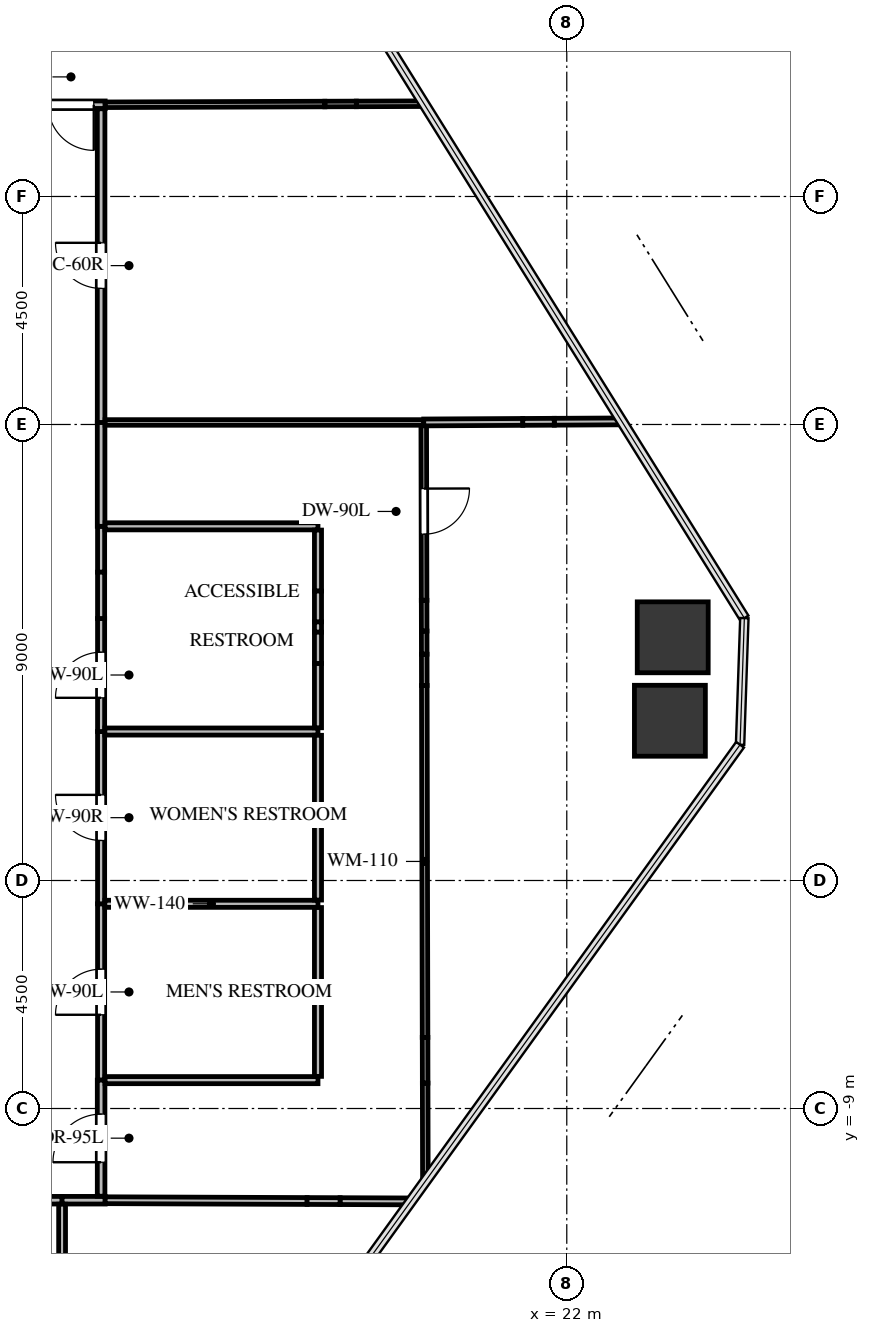
"""IFC4 building model, lengths in metres.
Left out: names, types, materials, properties, quantities, classifications, styles, units other than length and angle.
Written with IfcOpenShell. Run it as: python <this file> out.ifc"""

import sys

from ifc_helpers import new_model, si_unit, direction, frame, frame_2d, origin, origin_2d, place, context, subcontext, project, spatial, rectangle, extrude, source, transform, mapped, element, fill, save


model = new_model("IFC4")
c1 = context("Model", 3, precision=1e-05, world=origin(), true_north=direction((0.0, 1.0)))
c2 = subcontext(c1, "Body", "Model", "MODEL_VIEW")
j1 = project(units=[si_unit("LENGTHUNIT", "METRE"), si_unit("PLANEANGLEUNIT", "RADIAN")], contexts=[c1])
p1 = place(None, origin())
s1 = spatial("IfcSite", under=j1, at=p1, CompositionType="ELEMENT")
p2 = place(p1, origin())
s2 = spatial("IfcBuilding", under=s1, at=p2, CompositionType="ELEMENT")
p3 = place(p2, frame((0.0, 0.0, 75.3)))
s3 = spatial("IfcBuildingStorey", under=s2, at=p3, CompositionType="ELEMENT", Elevation=75.3)
m1 = source(origin(), c2, "Body", "SweptSolid", [
    extrude(rectangle(XDim=1.4, YDim=1.4, at=origin_2d()), origin(), (0.0, 0.0, 1.0), 3.0),
])
for number, where, z_axis, x_axis in (
    (1, (24.091, 0.3, -0.24), (0.0, 0.0, 1.0), (1.0, 0.0, 0.0)),
    (2, (24.035, -1.347, -0.24), (0.0, 0.0, 1.0), (1.0, 0.0, 0.0)),
):
    element("IfcColumn", number, at=place(p3, frame(where, z_axis=z_axis, x_axis=x_axis)), inside=s3, PredefinedType="COLUMN", context=c2, shape_type="MappedRepresentation", body=[
        mapped(m1, transform((0.0, 0.0, 0.0), x_axis=(1.0, 0.0, 0.0), y_axis=(0.0, 1.0, 0.0), z_axis=(0.0, 0.0, 1.0), scale=1.0)),
    ])
p4 = place(p3, frame((12.81, -8.44, 0.0), z_axis=(0.0, 0.0, 1.0), x_axis=(0.0, 1.0, 0.0)))
e3 = element("IfcWall", 3, at=p4, inside=s3, PredefinedType="PARTITIONING", context=c2, shape_type="SweptSolid", body=[
    extrude(rectangle(XDim=3.48, YDim=0.14, at=frame_2d((1.74, 0.0))), origin(), (0.0, 0.0, 1.0), 2.745),
])
p5 = place(p4, frame((1.29, 0.0, 0.0)))
e4 = element("IfcOpeningElement", 4, at=p5, cuts=e3, PredefinedType="OPENING", context=c2, shape_type="SweptSolid", body=[
    extrude(rectangle(XDim=0.9, YDim=2.05, at=frame_2d((0.45, 1.025))), frame((0.0, 0.08, 0.0), z_axis=(0.0, -1.0, 0.0), x_axis=(1.0, 0.0, 0.0)), (0.0, 0.0, 1.0), 0.16),
])
p6 = place(p3, frame((12.81, -4.96, 0.0), z_axis=(0.0, 0.0, 1.0), x_axis=(0.0, 1.0, 0.0)))
e5 = element("IfcWall", 5, at=p6, inside=s3, PredefinedType="PARTITIONING", context=c2, shape_type="SweptSolid", body=[
    extrude(rectangle(XDim=3.4, YDim=0.14, at=frame_2d((1.7, 0.0))), origin(), (0.0, 0.0, 1.0), 2.745),
])
p7 = place(p6, frame((1.25, 0.0, 0.0)))
e6 = element("IfcOpeningElement", 6, at=p7, cuts=e5, PredefinedType="OPENING", context=c2, shape_type="SweptSolid", body=[
    extrude(rectangle(XDim=0.9, YDim=2.05, at=frame_2d((0.45, 1.025))), frame((0.0, 0.08, 0.0), z_axis=(0.0, -1.0, 0.0), x_axis=(1.0, 0.0, 0.0)), (0.0, 0.0, 1.0), 0.16),
])
p8 = place(p3, frame((12.81, -1.56, 0.0), z_axis=(0.0, 0.0, 1.0), x_axis=(0.0, 1.0, 0.0)))
e7 = element("IfcWall", 7, at=p8, inside=s3, PredefinedType="PARTITIONING", context=c2, shape_type="SweptSolid", body=[
    extrude(rectangle(XDim=2.231, YDim=0.14, at=frame_2d((1.116, 0.0))), origin(), (0.0, 0.0, 1.0), 2.745),
])
p9 = place(p8, frame((0.666, 0.0, 0.0)))
e8 = element("IfcOpeningElement", 8, at=p9, cuts=e7, PredefinedType="OPENING", context=c2, shape_type="SweptSolid", body=[
    extrude(rectangle(XDim=0.9, YDim=2.05, at=frame_2d((0.45, 1.025))), frame((0.0, 0.08, 0.0), z_axis=(0.0, -1.0, 0.0), x_axis=(1.0, 0.0, 0.0)), (0.0, 0.0, 1.0), 0.16),
])
p10 = place(p3, frame((12.81, 1.585, 0.0), z_axis=(0.0, 0.0, 1.0), x_axis=(0.0, 1.0, 0.0)))
e9 = element("IfcWall", 9, at=p10, inside=s3, PredefinedType="PARTITIONING", context=c2, shape_type="SweptSolid", body=[
    extrude(rectangle(XDim=0.905, YDim=0.14, at=frame_2d((0.453, 0.0))), origin(), (0.0, 0.0, 1.0), 2.745),
])
p11 = place(p3, frame((12.81, 0.671, 0.0), z_axis=(0.0, 0.0, 1.0), x_axis=(0.0, 1.0, 0.0)))
e10 = element("IfcWall", 10, at=p11, inside=s3, PredefinedType="PARTITIONING", context=c2, shape_type="SweptSolid", body=[
    extrude(rectangle(XDim=0.914, YDim=0.14, at=frame_2d((0.457, 0.0))), origin(), (0.0, 0.0, 1.0), 1.83),
])
p12 = place(p3, frame((12.89, 10.81, 0.0), z_axis=(0.0, 0.0, 1.0), x_axis=(-1.0, 0.0, 0.0)))
e11 = element("IfcWall", 11, at=p12, inside=s3, PredefinedType="PARTITIONING", context=c2, shape_type="SweptSolid", body=[
    extrude(rectangle(XDim=1.35, YDim=0.15, at=frame_2d((0.675, 0.0))), origin(), (0.0, 0.0, 1.0), 2.745),
])
p13 = place(p12, frame((0.225, 0.0, 0.0)))
e12 = element("IfcOpeningElement", 12, at=p13, cuts=e11, PredefinedType="OPENING", context=c2, shape_type="SweptSolid", body=[
    extrude(rectangle(XDim=0.9, YDim=2.05, at=frame_2d((0.45, 1.025))), frame((0.0, 0.085, 0.0), z_axis=(0.0, -1.0, 0.0), x_axis=(1.0, 0.0, 0.0)), (0.0, 0.0, 1.0), 0.17),
])
p14 = place(p3, frame((5.817, -10.81, 0.0), z_axis=(0.0, 0.0, 1.0), x_axis=(1.0, 0.0, 0.0)))
e13 = element("IfcWall", 13, at=p14, inside=s3, PredefinedType="PARTITIONING", context=c2, shape_type="SweptSolid", body=[
    extrude(rectangle(XDim=6.223, YDim=0.15, at=frame_2d((3.111, 0.0))), origin(), (0.0, 0.0, 1.0), 1.83),
])
p15 = place(p3, frame((12.04, -10.81, 0.0), z_axis=(0.0, 0.0, 1.0), x_axis=(1.0, 0.0, 0.0)))
e14 = element("IfcWall", 14, at=p15, inside=s3, PredefinedType="PARTITIONING", context=c2, shape_type="SweptSolid", body=[
    extrude(rectangle(XDim=0.85, YDim=0.15, at=frame_2d((0.425, 0.0))), origin(), (0.0, 0.0, 1.0), 2.745),
])
p16 = place(p3, frame((12.81, -10.731, 0.0), z_axis=(0.0, 0.0, 1.0), x_axis=(0.0, 1.0, 0.0)))
e15 = element("IfcWall", 15, at=p16, inside=s3, PredefinedType="PARTITIONING", context=c2, shape_type="SweptSolid", body=[
    extrude(rectangle(XDim=2.291, YDim=0.15, at=frame_2d((1.146, 0.0))), origin(), (0.0, 0.0, 1.0), 2.745),
])
p17 = place(p16, frame((0.67, 0.0, 0.0)))
e16 = element("IfcOpeningElement", 16, at=p17, cuts=e15, PredefinedType="OPENING", context=c2, shape_type="SweptSolid", body=[
    extrude(rectangle(XDim=0.95, YDim=2.1, at=frame_2d((0.475, 1.05))), frame((0.0, 0.085, 0.0), z_axis=(0.0, -1.0, 0.0), x_axis=(1.0, 0.0, 0.0)), (0.0, 0.0, 1.0), 0.17),
])
p18 = place(p3, frame((12.81, 2.49, 0.0), z_axis=(0.0, 0.0, 1.0), x_axis=(0.0, 1.0, 0.0)))
e17 = element("IfcWall", 17, at=p18, inside=s3, PredefinedType="PARTITIONING", context=c2, shape_type="SweptSolid", body=[
    extrude(rectangle(XDim=2.05, YDim=0.15, at=frame_2d((1.025, 0.0))), origin(), (0.0, 0.0, 1.0), 2.745),
])
p19 = place(p3, frame((12.81, 4.54, 0.0), z_axis=(0.0, 0.0, 1.0), x_axis=(0.0, 1.0, 0.0)))
e18 = element("IfcWall", 18, at=p19, inside=s3, PredefinedType="PARTITIONING", context=c2, shape_type="SweptSolid", body=[
    extrude(rectangle(XDim=6.191, YDim=0.15, at=frame_2d((3.095, 0.0))), origin(), (0.0, 0.0, 1.0), 2.745),
])
p20 = place(p19, frame((2.646, 0.0, 0.0)))
e19 = element("IfcOpeningElement", 19, at=p20, cuts=e18, PredefinedType="OPENING", context=c2, shape_type="SweptSolid", body=[
    extrude(rectangle(XDim=0.9, YDim=2.05, at=frame_2d((0.45, 1.025))), frame((0.0, 0.085, 0.0), z_axis=(0.0, -1.0, 0.0), x_axis=(1.0, 0.0, 0.0)), (0.0, 0.0, 1.0), 0.17),
])
p21 = place(p3, frame((12.884, -4.96, 0.0), z_axis=(0.0, 0.0, 1.0), x_axis=(1.0, 0.0, 0.0)))
e20 = element("IfcWall", 20, at=p21, inside=s3, PredefinedType="PARTITIONING", context=c2, shape_type="SweptSolid", body=[
    extrude(rectangle(XDim=4.206, YDim=0.14, at=frame_2d((2.103, 0.0))), origin(), (0.0, 0.0, 1.0), 2.745),
])
p22 = place(p3, frame((17.09, -8.44, 0.0), z_axis=(0.0, 0.0, 1.0), x_axis=(-1.0, 0.0, 0.0)))
e21 = element("IfcWall", 21, at=p22, inside=s3, PredefinedType="PARTITIONING", context=c2, shape_type="SweptSolid", body=[
    extrude(rectangle(XDim=4.201, YDim=0.14, at=frame_2d((2.101, 0.0))), origin(), (0.0, 0.0, 1.0), 2.745),
])
p23 = place(p3, frame((17.09, -5.034, 0.0), z_axis=(0.0, 0.0, 1.0), x_axis=(0.0, -1.0, 0.0)))
e22 = element("IfcWall", 22, at=p23, inside=s3, PredefinedType="PARTITIONING", context=c2, shape_type="SweptSolid", body=[
    extrude(rectangle(XDim=3.332, YDim=0.14, at=frame_2d((1.666, 0.0))), origin(), (0.0, 0.0, 1.0), 2.745),
])
p24 = place(p3, frame((12.884, -1.56, 0.0), z_axis=(0.0, 0.0, 1.0), x_axis=(1.0, 0.0, 0.0)))
e23 = element("IfcWall", 23, at=p24, inside=s3, PredefinedType="PARTITIONING", context=c2, shape_type="SweptSolid", body=[
    extrude(rectangle(XDim=4.206, YDim=0.14, at=frame_2d((2.103, 0.0))), origin(), (0.0, 0.0, 1.0), 2.745),
])
p25 = place(p3, frame((17.09, -1.634, 0.0), z_axis=(0.0, 0.0, 1.0), x_axis=(0.0, -1.0, 0.0)))
e24 = element("IfcWall", 24, at=p25, inside=s3, PredefinedType="PARTITIONING", context=c2, shape_type="SweptSolid", body=[
    extrude(rectangle(XDim=3.252, YDim=0.14, at=frame_2d((1.626, 0.0))), origin(), (0.0, 0.0, 1.0), 2.745),
])
p26 = place(p3, frame((12.889, 2.49, 0.0), z_axis=(0.0, 0.0, 1.0), x_axis=(1.0, 0.0, 0.0)))
e25 = element("IfcWall", 25, at=p26, inside=s3, PredefinedType="PARTITIONING", context=c2, shape_type="SweptSolid", body=[
    extrude(rectangle(XDim=4.201, YDim=0.14, at=frame_2d((2.101, 0.0))), origin(), (0.0, 0.0, 1.0), 2.745),
])
p27 = place(p3, frame((17.09, 2.416, 0.0), z_axis=(0.0, 0.0, 1.0), x_axis=(0.0, -1.0, 0.0)))
e26 = element("IfcWall", 26, at=p27, inside=s3, PredefinedType="PARTITIONING", context=c2, shape_type="SweptSolid", body=[
    extrude(rectangle(XDim=1.204, YDim=0.14, at=frame_2d((0.602, 0.0))), origin(), (0.0, 0.0, 1.0), 2.745),
])
p28 = place(p3, frame((17.09, 0.606, 0.0), z_axis=(0.0, 0.0, 1.0), x_axis=(0.0, -1.0, 0.0)))
e27 = element("IfcWall", 27, at=p28, inside=s3, PredefinedType="PARTITIONING", context=c2, shape_type="SweptSolid", body=[
    extrude(rectangle(XDim=0.205, YDim=0.14, at=frame_2d((0.103, 0.0))), origin(), (0.0, 0.0, 1.0), 2.745),
])
p29 = place(p3, frame((17.09, -0.216, 0.0), z_axis=(0.0, 0.0, 1.0), x_axis=(0.0, -1.0, 0.0)))
e28 = element("IfcWall", 28, at=p29, inside=s3, PredefinedType="PARTITIONING", context=c2, shape_type="SweptSolid", body=[
    extrude(rectangle(XDim=1.27, YDim=0.14, at=frame_2d((0.635, 0.0))), origin(), (0.0, 0.0, 1.0), 2.745),
])
p30 = place(p3, frame((17.09, 1.212, 0.0), z_axis=(0.0, 0.0, 1.0), x_axis=(0.0, -1.0, 0.0)))
e29 = element("IfcWall", 29, at=p30, inside=s3, PredefinedType="PARTITIONING", context=c2, shape_type="SweptSolid", body=[
    extrude(rectangle(XDim=0.606, YDim=0.14, at=frame_2d((0.303, 0.0))), origin(), (0.0, 0.0, 1.0), 1.83),
])
p31 = place(p3, frame((17.09, 0.401, 0.0), z_axis=(0.0, 0.0, 1.0), x_axis=(0.0, -1.0, 0.0)))
e30 = element("IfcWall", 30, at=p31, inside=s3, PredefinedType="PARTITIONING", context=c2, shape_type="SweptSolid", body=[
    extrude(rectangle(XDim=0.617, YDim=0.14, at=frame_2d((0.309, 0.0))), origin(), (0.0, 0.0, 1.0), 1.83),
])
p32 = place(p3, frame((19.182, 10.831, 0.0), z_axis=(0.0, 0.0, 1.0), x_axis=(-0.999994579825, -0.00329246432, 0.0)))
e31 = element("IfcWall", 31, at=p32, inside=s3, PredefinedType="MOVABLE", context=c2, shape_type="SweptSolid", body=[
    extrude(rectangle(XDim=1.335, YDim=0.11, at=frame_2d((0.667, 0.0))), origin(), (0.0, 0.0, 1.0), 2.745),
])
p33 = place(p3, frame((17.225, 10.825, 0.0), z_axis=(0.0, 0.0, 1.0), x_axis=(-0.999994480721, -0.003322427884, 0.0)))
e32 = element("IfcWall", 32, at=p33, inside=s3, PredefinedType="MOVABLE", context=c2, shape_type="SweptSolid", body=[
    extrude(rectangle(XDim=4.335, YDim=0.11, at=frame_2d((2.168, 0.0))), origin(), (0.0, 0.0, 1.0), 2.745),
])
p34 = place(p3, frame((17.847, 10.827, 0.0), z_axis=(0.0, 0.0, 1.0), x_axis=(-0.999993761903, -0.00353216007, 0.0)))
e33 = element("IfcWall", 33, at=p34, inside=s3, PredefinedType="MOVABLE", context=c2, shape_type="SweptSolid", body=[
    extrude(rectangle(XDim=0.622, YDim=0.11, at=frame_2d((0.311, 0.0))), origin(), (0.0, 0.0, 1.0), 2.08),
])
p35 = place(p3, frame((12.04, -10.889, 0.0), z_axis=(0.0, 0.0, 1.0), x_axis=(0.0, -1.0, 0.0)))
e34 = element("IfcWall", 34, at=p35, inside=s3, PredefinedType="PARTITIONING", context=c2, shape_type="SweptSolid", body=[
    extrude(rectangle(XDim=4.584, YDim=0.135, at=frame_2d((2.292, 0.0))), origin(), (0.0, 0.0, 1.0), 2.745),
])
p36 = place(p35, frame((1.842, 0.0, 0.0)))
e35 = element("IfcOpeningElement", 35, at=p36, cuts=e34, PredefinedType="OPENING", context=c2, shape_type="SweptSolid", body=[
    extrude(rectangle(XDim=0.9, YDim=2.05, at=frame_2d((0.45, 1.025))), frame((0.0, 0.078, 0.0), z_axis=(0.0, -1.0, 0.0), x_axis=(1.0, 0.0, 0.0)), (0.0, 0.0, 1.0), 0.155),
])
p37 = place(p3, frame((12.89, -10.81, 0.0), z_axis=(0.0, 0.0, 1.0), x_axis=(0.999992552799, -0.003859319458, 0.0)))
e36 = element("IfcWall", 36, at=p37, inside=s3, PredefinedType="PARTITIONING", context=c2, shape_type="SweptSolid", body=[
    extrude(rectangle(XDim=3.985, YDim=0.135, at=frame_2d((1.993, 0.0))), origin(), (0.0, 0.0, 1.0), 2.745),
])
p38 = place(p3, frame((17.526, -10.828, 0.0), z_axis=(0.0, 0.0, 1.0), x_axis=(0.999992598457, -0.003847470648, 0.0)))
e37 = element("IfcWall", 37, at=p38, inside=s3, PredefinedType="PARTITIONING", context=c2, shape_type="SweptSolid", body=[
    extrude(rectangle(XDim=1.396, YDim=0.135, at=frame_2d((0.698, 0.0))), origin(), (0.0, 0.0, 1.0), 2.745),
])
p39 = place(p3, frame((16.875, -10.826, 0.0), z_axis=(0.0, 0.0, 1.0), x_axis=(0.999992960027, -0.003752318799, 0.0)))
e38 = element("IfcWall", 38, at=p39, inside=s3, PredefinedType="PARTITIONING", context=c2, shape_type="SweptSolid", body=[
    extrude(rectangle(XDim=0.651, YDim=0.135, at=frame_2d((0.325, 0.0))), origin(), (0.0, 0.0, 1.0), 2.08),
])
p40 = place(p3, frame((19.177, 4.54, 0.0), z_axis=(0.0, 0.0, 1.0), x_axis=(0.002156066765, -0.999997675685, 0.0)))
e39 = element("IfcWall", 39, at=p40, inside=s3, PredefinedType="MOVABLE", context=c2, shape_type="SweptSolid", body=[
    extrude(rectangle(XDim=3.51, YDim=0.11, at=frame_2d((1.755, 0.0))), origin(), (0.0, 0.0, 1.0), 2.745),
])
p41 = place(p40, frame((1.305, 0.0, 0.0)))
e40 = element("IfcOpeningElement", 40, at=p41, cuts=e39, PredefinedType="OPENING", context=c2, shape_type="SweptSolid", body=[
    extrude(rectangle(XDim=0.9, YDim=2.05, at=frame_2d((0.45, 1.025))), frame((0.0, 0.065, 0.0), z_axis=(0.0, -1.0, 0.0), x_axis=(1.0, 0.0, 0.0)), (0.0, 0.0, 1.0), 0.13),
])
p42 = place(p3, frame((19.186, 0.424, 0.0), z_axis=(0.0, 0.0, 1.0), x_axis=(0.002668080151, -0.999996440668, 0.0)))
e41 = element("IfcWall", 41, at=p42, inside=s3, PredefinedType="MOVABLE", context=c2, shape_type="SweptSolid", body=[
    extrude(rectangle(XDim=0.458, YDim=0.11, at=frame_2d((0.229, 0.0))), origin(), (0.0, 0.0, 1.0), 2.745),
])
p43 = place(p3, frame((19.188, -0.651, 0.0), z_axis=(0.0, 0.0, 1.0), x_axis=(0.002179256688, -0.999997625417, 0.0)))
e42 = element("IfcWall", 42, at=p43, inside=s3, PredefinedType="MOVABLE", context=c2, shape_type="SweptSolid", body=[
    extrude(rectangle(XDim=6.946, YDim=0.11, at=frame_2d((3.473, 0.0))), origin(), (0.0, 0.0, 1.0), 2.08),
])
p44 = place(p3, frame((19.205, -8.499, 0.0), z_axis=(0.0, 0.0, 1.0), x_axis=(0.002270428053, -0.999997422575, 0.0)))
e43 = element("IfcWall", 43, at=p44, inside=s3, PredefinedType="MOVABLE", context=c2, shape_type="SweptSolid", body=[
    extrude(rectangle(XDim=1.936, YDim=0.11, at=frame_2d((0.968, 0.0))), origin(), (0.0, 0.0, 1.0), 2.08),
])
p45 = place(p3, frame((19.185, 1.03, 0.0), z_axis=(0.0, 0.0, 1.0), x_axis=(0.00201368903, -0.999997972526, 0.0)))
e44 = element("IfcWall", 44, at=p45, inside=s3, PredefinedType="MOVABLE", context=c2, shape_type="SweptSolid", body=[
    extrude(rectangle(XDim=0.606, YDim=0.11, at=frame_2d((0.303, 0.0))), origin(), (0.0, 0.0, 1.0), 1.83),
])
p46 = place(p3, frame((19.187, -0.034, 0.0), z_axis=(0.0, 0.0, 1.0), x_axis=(0.001978626914, -0.999998042516, 0.0)))
e45 = element("IfcWall", 45, at=p46, inside=s3, PredefinedType="MOVABLE", context=c2, shape_type="SweptSolid", body=[
    extrude(rectangle(XDim=0.617, YDim=0.11, at=frame_2d((0.309, 0.0))), origin(), (0.0, 0.0, 1.0), 1.83),
])
p47 = place(p3, frame((19.203, -7.597, 0.0), z_axis=(0.0, 0.0, 1.0), x_axis=(0.001894448563, -0.999998205531, 0.0)))
e46 = element("IfcWall", 46, at=p47, inside=s3, PredefinedType="MOVABLE", context=c2, shape_type="SweptSolid", body=[
    extrude(rectangle(XDim=0.902, YDim=0.11, at=frame_2d((0.451, 0.0))), origin(), (0.0, 0.0, 1.0), 2.08),
])
p48 = place(p3, frame((12.889, 4.54, 0.0), z_axis=(0.0, 0.0, 1.0), x_axis=(1.0, 0.0, 0.0)))
e47 = element("IfcWall", 47, at=p48, inside=s3, PredefinedType="MOVABLE", context=c2, shape_type="SweptSolid", body=[
    extrude(rectangle(XDim=6.288, YDim=0.11, at=frame_2d((3.144, 0.0))), origin(), (0.0, 0.0, 1.0), 2.745),
])
p49 = place(p3, frame((19.177, 4.54, 0.0), z_axis=(0.0, 0.0, 1.0), x_axis=(0.999985583847, 0.00536955296, 0.0)))
e48 = element("IfcWall", 48, at=p49, inside=s3, PredefinedType="PARTITIONING", context=c2, shape_type="SweptSolid", body=[
    extrude(rectangle(XDim=1.955, YDim=0.135, at=frame_2d((0.978, 0.0))), origin(), (0.0, 0.0, 1.0), 2.745),
])
p50 = place(p3, frame((21.753, 4.554, 0.0), z_axis=(0.0, 0.0, 1.0), x_axis=(0.999985895051, 0.005311280395, 0.0)))
e49 = element("IfcWall", 49, at=p50, inside=s3, PredefinedType="PARTITIONING", context=c2, shape_type="SweptSolid", body=[
    extrude(rectangle(XDim=1.333, YDim=0.135, at=frame_2d((0.667, 0.0))), origin(), (0.0, 0.0, 1.0), 2.745),
])
p51 = place(p3, frame((21.132, 4.551, 0.0), z_axis=(0.0, 0.0, 1.0), x_axis=(0.999986954142, 0.005107988371, 0.0)))
e50 = element("IfcWall", 50, at=p51, inside=s3, PredefinedType="PARTITIONING", context=c2, shape_type="SweptSolid", body=[
    extrude(rectangle(XDim=0.621, YDim=0.135, at=frame_2d((0.311, 0.0))), origin(), (0.0, 0.0, 1.0), 2.08),
])
m2 = source(origin(), c2, "Body", "SweptSolid", [
    extrude(rectangle(XDim=0.9, YDim=2.05, at=frame_2d((0.45, 1.025))), frame((0.0, 0.025, 0.0), z_axis=(0.0, -1.0, 0.0), x_axis=(1.0, 0.0, 0.0)), (0.0, 0.0, 1.0), 0.05),
])
p52 = place(p5, origin())
e51 = element("IfcDoor", 51, at=p52, inside=s3, OperationType="SINGLE_SWING_LEFT", PredefinedType="DOOR", context=c2, shape_type="MappedRepresentation", body=[
    mapped(m2, transform((0.0, 0.0, 0.0), x_axis=(1.0, 0.0, 0.0), y_axis=(0.0, 1.0, 0.0), z_axis=(0.0, 0.0, 1.0), scale=1.0)),
])
fill(e4, e51)
m3 = source(origin(), c2, "Body", "SweptSolid", [
    extrude(rectangle(XDim=0.9, YDim=2.05, at=frame_2d((0.45, 1.025))), frame((0.0, 0.025, 0.0), z_axis=(0.0, -1.0, 0.0), x_axis=(1.0, 0.0, 0.0)), (0.0, 0.0, 1.0), 0.05),
])
p53 = place(p7, origin())
e52 = element("IfcDoor", 52, at=p53, inside=s3, OperationType="SINGLE_SWING_RIGHT", PredefinedType="DOOR", context=c2, shape_type="MappedRepresentation", body=[
    mapped(m3, transform((0.0, 0.0, 0.0), x_axis=(1.0, 0.0, 0.0), y_axis=(0.0, 1.0, 0.0), z_axis=(0.0, 0.0, 1.0), scale=1.0)),
])
fill(e6, e52)
p54 = place(p9, origin())
e53 = element("IfcDoor", 53, at=p54, inside=s3, OperationType="SINGLE_SWING_LEFT", PredefinedType="DOOR", context=c2, shape_type="MappedRepresentation", body=[
    mapped(m2, transform((0.0, 0.0, 0.0), x_axis=(1.0, 0.0, 0.0), y_axis=(0.0, 1.0, 0.0), z_axis=(0.0, 0.0, 1.0), scale=1.0)),
])
fill(e8, e53)
p55 = place(p13, origin())
e54 = element("IfcDoor", 54, at=p55, inside=s3, OperationType="SINGLE_SWING_LEFT", PredefinedType="DOOR", context=c2, shape_type="MappedRepresentation", body=[
    mapped(m2, transform((0.0, 0.0, 0.0), x_axis=(1.0, 0.0, 0.0), y_axis=(0.0, 1.0, 0.0), z_axis=(0.0, 0.0, 1.0), scale=1.0)),
])
fill(e12, e54)
m4 = source(origin(), c2, "Body", "SweptSolid", [
    extrude(rectangle(XDim=0.95, YDim=2.1, at=frame_2d((0.475, 1.05))), frame((0.0, 0.025, 0.0), z_axis=(0.0, -1.0, 0.0), x_axis=(1.0, 0.0, 0.0)), (0.0, 0.0, 1.0), 0.05),
])
p56 = place(p17, origin())
e55 = element("IfcDoor", 55, at=p56, inside=s3, OperationType="SINGLE_SWING_LEFT", PredefinedType="DOOR", context=c2, shape_type="MappedRepresentation", body=[
    mapped(m4, transform((0.0, 0.0, 0.0), x_axis=(1.0, 0.0, 0.0), y_axis=(0.0, 1.0, 0.0), z_axis=(0.0, 0.0, 1.0), scale=1.0)),
])
fill(e16, e55)
m5 = source(origin(), c2, "Body", "SweptSolid", [
    extrude(rectangle(XDim=0.9, YDim=2.05, at=frame_2d((0.45, 1.025))), frame((0.0, 0.025, 0.0), z_axis=(0.0, -1.0, 0.0), x_axis=(1.0, 0.0, 0.0)), (0.0, 0.0, 1.0), 0.05),
])
p57 = place(p20, origin())
e56 = element("IfcDoor", 56, at=p57, inside=s3, OperationType="SINGLE_SWING_RIGHT", PredefinedType="DOOR", context=c2, shape_type="MappedRepresentation", body=[
    mapped(m5, transform((0.0, 0.0, 0.0), x_axis=(1.0, 0.0, 0.0), y_axis=(0.0, 1.0, 0.0), z_axis=(0.0, 0.0, 1.0), scale=1.0)),
])
fill(e19, e56)
p58 = place(p41, origin())
e57 = element("IfcDoor", 57, at=p58, inside=s3, OperationType="SINGLE_SWING_LEFT", PredefinedType="DOOR", context=c2, shape_type="MappedRepresentation", body=[
    mapped(m2, transform((0.0, 0.0, 0.0), x_axis=(1.0, 0.0, 0.0), y_axis=(0.0, 1.0, 0.0), z_axis=(0.0, 0.0, 1.0), scale=1.0)),
])
fill(e40, e57)
save(model, sys.argv[1])
